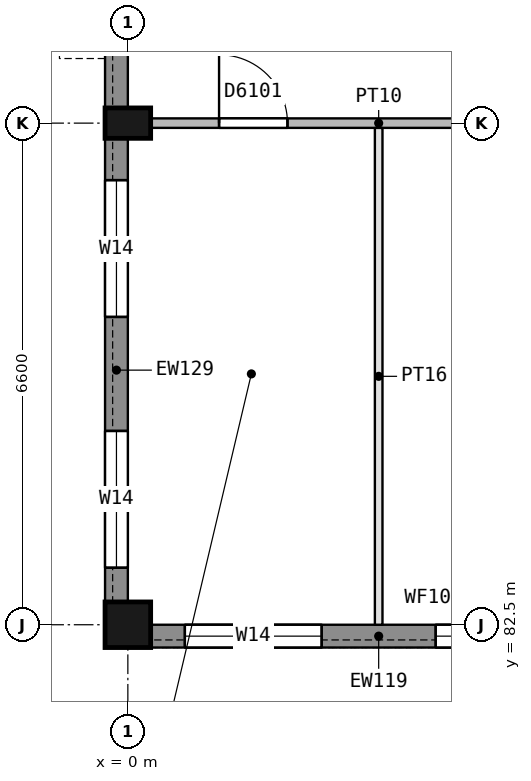
"""IFC4 building model, lengths in metres.
Left out: names, types, materials, properties, quantities, classifications, styles, units other than length and angle.
Written with IfcOpenShell. Run it as: python <this file> out.ifc"""

import sys

from ifc_helpers import new_model, si_unit, direction, frame, frame_2d, origin, origin_2d, place, context, subcontext, project, spatial, rectangle, extrude, element, fill, save


model = new_model("IFC4")
c1 = context("Model", 3, precision=1e-05, world=origin(), true_north=direction((0.0, 1.0)))
c2 = subcontext(c1, "Body", "Model", "MODEL_VIEW")
j1 = project(units=[si_unit("LENGTHUNIT", "METRE"), si_unit("PLANEANGLEUNIT", "RADIAN")], contexts=[c1])
p1 = place(None, origin())
s1 = spatial("IfcSite", under=j1, at=p1, CompositionType="ELEMENT")
p2 = place(p1, origin())
s2 = spatial("IfcBuilding", under=s1, at=p2, CompositionType="ELEMENT")
p3 = place(p2, frame((0.0, 0.0, 5.4)))
s3 = spatial("IfcBuildingStorey", under=s2, at=p3, CompositionType="ELEMENT", Elevation=5.4)
p4 = place(p3, frame((0.0, 82.5, 0.0), z_axis=(0.0, 0.0, 1.0), x_axis=(1.0, 0.0, 0.0)))
e1 = element("IfcColumn", 1, at=p4, inside=s3, PredefinedType="COLUMN", context=c2, shape_type="SweptSolid", body=[
    extrude(rectangle(XDim=0.6, YDim=0.6, at=origin_2d()), origin(), (0.0, 0.0, 1.0), 4.5),
])
p5 = place(p3, frame((0.0, 89.1, 0.0), z_axis=(0.0, 0.0, 1.0), x_axis=(1.0, 0.0, 0.0)))
e2 = element("IfcColumn", 2, at=p5, inside=s3, PredefinedType="COLUMN", context=c2, shape_type="SweptSolid", body=[
    extrude(rectangle(XDim=0.6, YDim=0.4, at=origin_2d()), origin(), (0.0, 0.0, 1.0), 4.5),
])
p6 = place(p3, frame((6.3, 82.35, 0.0), z_axis=(0.0, 0.0, 1.0), x_axis=(-1.0, 0.0, 0.0)))
e3 = element("IfcWall", 3, at=p6, inside=s3, PredefinedType="STANDARD", context=c2, shape_type="SweptSolid", body=[
    extrude(rectangle(XDim=6.0, YDim=0.3, at=frame_2d((3.0, 0.0))), origin(), (0.0, 0.0, 1.0), 3.65),
])
p7 = place(p6, frame((3.75, 0.0, 0.9)))
e4 = element("IfcOpeningElement", 4, at=p7, cuts=e3, PredefinedType="OPENING", context=c2, shape_type="SweptSolid", body=[
    extrude(rectangle(XDim=1.8, YDim=1.5, at=frame_2d((0.9, 0.75))), frame((0.0, 0.16, 0.0), z_axis=(0.0, -1.0, 0.0), x_axis=(1.0, 0.0, 0.0)), (0.0, 0.0, 1.0), 0.32),
])
p8 = place(p6, frame((0.45, 0.0, 0.9)))
e5 = element("IfcOpeningElement", 5, at=p8, cuts=e3, PredefinedType="OPENING", context=c2, shape_type="SweptSolid", body=[
    extrude(rectangle(XDim=1.8, YDim=1.5, at=frame_2d((0.9, 0.75))), frame((0.0, 0.16, 0.0), z_axis=(0.0, -1.0, 0.0), x_axis=(1.0, 0.0, 0.0)), (0.0, 0.0, 1.0), 0.32),
])
p9 = place(p3, frame((-0.15, 82.8, 0.0), z_axis=(0.0, 0.0, 1.0), x_axis=(0.0, 1.0, 0.0)))
e6 = element("IfcWall", 6, at=p9, inside=s3, PredefinedType="STANDARD", context=c2, shape_type="SweptSolid", body=[
    extrude(rectangle(XDim=6.1, YDim=0.3, at=frame_2d((3.05, 0.0))), origin(), (0.0, 0.0, 1.0), 3.65),
])
p10 = place(p9, frame((0.45, 0.0, 0.9)))
e7 = element("IfcOpeningElement", 7, at=p10, cuts=e6, PredefinedType="OPENING", context=c2, shape_type="SweptSolid", body=[
    extrude(rectangle(XDim=1.8, YDim=1.5, at=frame_2d((0.9, 0.75))), frame((0.0, 0.16, 0.0), z_axis=(0.0, -1.0, 0.0), x_axis=(1.0, 0.0, 0.0)), (0.0, 0.0, 1.0), 0.32),
])
p11 = place(p9, frame((3.75, 0.0, 0.9)))
e8 = element("IfcOpeningElement", 8, at=p11, cuts=e6, PredefinedType="OPENING", context=c2, shape_type="SweptSolid", body=[
    extrude(rectangle(XDim=1.8, YDim=1.5, at=frame_2d((0.9, 0.75))), frame((0.0, 0.16, 0.0), z_axis=(0.0, -1.0, 0.0), x_axis=(1.0, 0.0, 0.0)), (0.0, 0.0, 1.0), 0.32),
])
p12 = place(p3, frame((-0.15, 89.3, 0.0), z_axis=(0.0, 0.0, 1.0), x_axis=(0.0, 1.0, 0.0)))
e9 = element("IfcWall", 9, at=p12, inside=s3, PredefinedType="STANDARD", context=c2, shape_type="SweptSolid", body=[
    extrude(rectangle(XDim=3.1, YDim=0.3, at=frame_2d((1.55, 0.0))), origin(), (0.0, 0.0, 1.0), 3.65),
])
p13 = place(p12, frame((0.85, 0.0, 1.1)))
e10 = element("IfcOpeningElement", 10, at=p13, cuts=e9, PredefinedType="OPENING", context=c2, shape_type="SweptSolid", body=[
    extrude(rectangle(XDim=1.2, YDim=1.2, at=frame_2d((0.6, 0.6))), frame((0.0, 0.16, 0.0), z_axis=(0.0, -1.0, 0.0), x_axis=(1.0, 0.0, 0.0)), (0.0, 0.0, 1.0), 0.32),
])
p14 = place(p3, frame((6.3, 89.1, 0.0), z_axis=(0.0, 0.0, 1.0), x_axis=(-1.0, 0.0, 0.0)))
e11 = element("IfcWall", 11, at=p14, inside=s3, PredefinedType="PARTITIONING", context=c2, shape_type="SweptSolid", body=[
    extrude(rectangle(XDim=6.0, YDim=0.125, at=frame_2d((3.0, 0.0))), origin(), (0.0, 0.0, 1.0), 3.65),
])
p15 = place(p14, frame((4.2, 0.0, 0.0)))
e12 = element("IfcOpeningElement", 12, at=p15, cuts=e11, PredefinedType="OPENING", context=c2, shape_type="SweptSolid", body=[
    extrude(rectangle(XDim=0.9, YDim=2.1, at=frame_2d((0.45, 1.05))), frame((0.0, 0.073, 0.0), z_axis=(0.0, -1.0, 0.0), x_axis=(1.0, 0.0, 0.0)), (0.0, 0.0, 1.0), 0.145),
])
p16 = place(p14, frame((0.9, 0.0, 0.0)))
e13 = element("IfcOpeningElement", 13, at=p16, cuts=e11, PredefinedType="OPENING", context=c2, shape_type="SweptSolid", body=[
    extrude(rectangle(XDim=0.9, YDim=2.1, at=frame_2d((0.45, 1.05))), frame((0.0, 0.073, 0.0), z_axis=(0.0, -1.0, 0.0), x_axis=(1.0, 0.0, 0.0)), (0.0, 0.0, 1.0), 0.145),
])
p17 = place(p3, frame((3.3, 82.5, 0.0), z_axis=(0.0, 0.0, 1.0), x_axis=(0.0, 1.0, 0.0)))
e14 = element("IfcWall", 14, at=p17, inside=s3, PredefinedType="PARTITIONING", context=c2, shape_type="SweptSolid", body=[
    extrude(rectangle(XDim=6.537, YDim=0.1, at=frame_2d((3.269, 0.0))), origin(), (0.0, 0.0, 1.0), 3.65),
])
p18 = place(p7, origin())
e15 = element("IfcWindow", 15, at=p18, inside=s3, PartitioningType="SINGLE_PANEL", PredefinedType="WINDOW", context=c2, shape_type="SweptSolid", body=[
    extrude(rectangle(XDim=1.8, YDim=1.5, at=frame_2d((0.9, 0.75))), frame((0.0, 0.03, 0.0), z_axis=(0.0, -1.0, 0.0), x_axis=(1.0, 0.0, 0.0)), (0.0, 0.0, 1.0), 0.06),
])
fill(e4, e15)
p19 = place(p8, origin())
e16 = element("IfcWindow", 16, at=p19, inside=s3, PartitioningType="SINGLE_PANEL", PredefinedType="WINDOW", context=c2, shape_type="SweptSolid", body=[
    extrude(rectangle(XDim=1.8, YDim=1.5, at=frame_2d((0.9, 0.75))), frame((0.0, 0.03, 0.0), z_axis=(0.0, -1.0, 0.0), x_axis=(1.0, 0.0, 0.0)), (0.0, 0.0, 1.0), 0.06),
])
fill(e5, e16)
p20 = place(p10, origin())
e17 = element("IfcWindow", 17, at=p20, inside=s3, PartitioningType="SINGLE_PANEL", PredefinedType="WINDOW", context=c2, shape_type="SweptSolid", body=[
    extrude(rectangle(XDim=1.8, YDim=1.5, at=frame_2d((0.9, 0.75))), frame((0.0, 0.03, 0.0), z_axis=(0.0, -1.0, 0.0), x_axis=(1.0, 0.0, 0.0)), (0.0, 0.0, 1.0), 0.06),
])
fill(e7, e17)
p21 = place(p11, origin())
e18 = element("IfcWindow", 18, at=p21, inside=s3, PartitioningType="SINGLE_PANEL", PredefinedType="WINDOW", context=c2, shape_type="SweptSolid", body=[
    extrude(rectangle(XDim=1.8, YDim=1.5, at=frame_2d((0.9, 0.75))), frame((0.0, 0.03, 0.0), z_axis=(0.0, -1.0, 0.0), x_axis=(1.0, 0.0, 0.0)), (0.0, 0.0, 1.0), 0.06),
])
fill(e8, e18)
p22 = place(p15, origin())
e19 = element("IfcDoor", 19, at=p22, inside=s3, OperationType="SINGLE_SWING_RIGHT", PredefinedType="DOOR", context=c2, shape_type="SweptSolid", body=[
    extrude(rectangle(XDim=0.9, YDim=2.1, at=frame_2d((0.45, 1.05))), frame((0.0, 0.025, 0.0), z_axis=(0.0, -1.0, 0.0), x_axis=(1.0, 0.0, 0.0)), (0.0, 0.0, 1.0), 0.05),
])
fill(e12, e19)
save(model, sys.argv[1])
